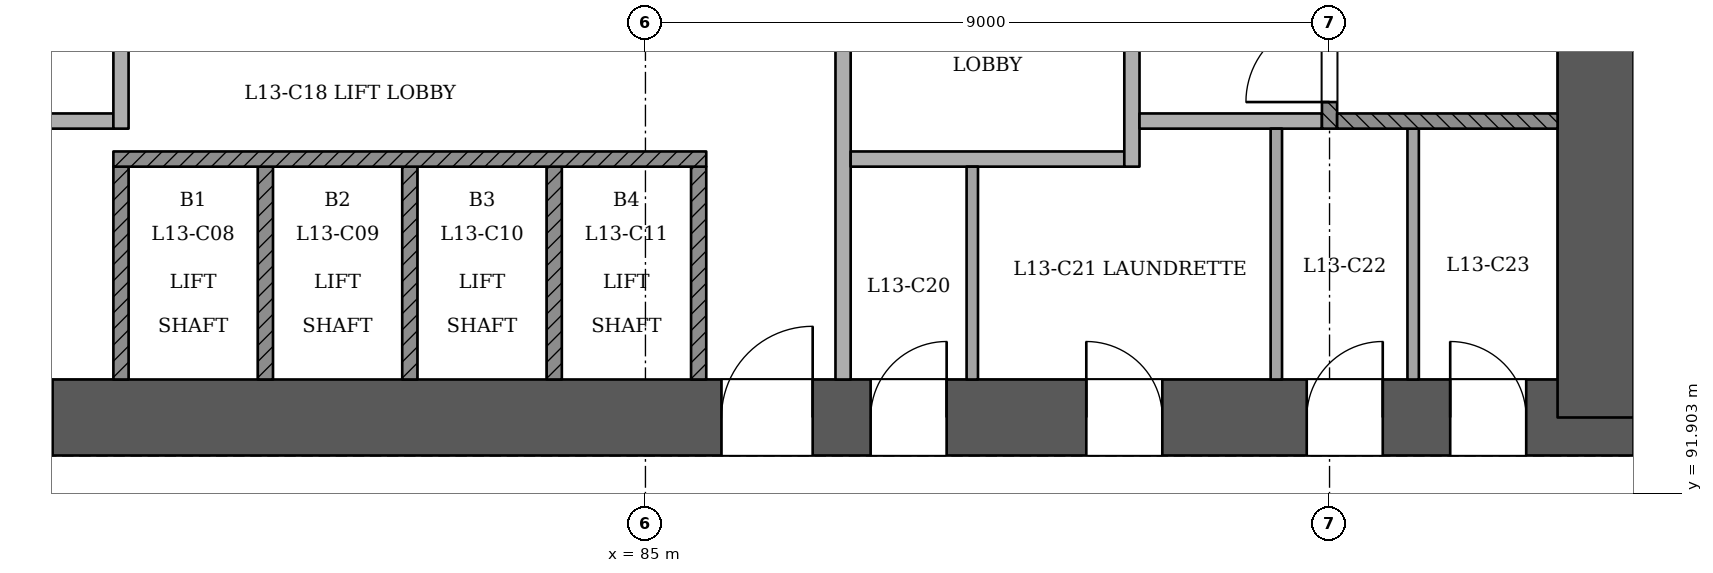
"""IFC4 building model, lengths in metres.
Left out: names, types, materials, properties, quantities, classifications, styles, units other than length and angle.
Written with IfcOpenShell. Run it as: python <this file> out.ifc"""

import sys

from ifc_helpers import new_model, si_unit, direction, frame, frame_2d, origin, place, context, subcontext, project, spatial, rectangle, extrude, element, fill, save


model = new_model("IFC4")
c1 = context("Model", 3, precision=1e-05, world=origin(), true_north=direction((0.0, 1.0)))
c2 = subcontext(c1, "Body", "Model", "MODEL_VIEW")
j1 = project(units=[si_unit("LENGTHUNIT", "METRE"), si_unit("PLANEANGLEUNIT", "RADIAN")], contexts=[c1])
p1 = place(None, origin())
s1 = spatial("IfcSite", under=j1, at=p1, CompositionType="ELEMENT")
p2 = place(p1, origin())
s2 = spatial("IfcBuilding", under=s1, at=p2, CompositionType="ELEMENT")
p3 = place(p2, frame((0.0, 0.0, 55.8)))
s3 = spatial("IfcBuildingStorey", under=s2, at=p3, CompositionType="ELEMENT", Elevation=55.8)
p4 = place(p3, frame((72.5, 92.9, 0.0), z_axis=(0.0, 0.0, 1.0), x_axis=(1.0, 0.0, 0.0)))
e1 = element("IfcWall", 1, at=p4, inside=s3, PredefinedType="SHEAR", context=c2, shape_type="SweptSolid", body=[
    extrude(rectangle(XDim=25.5, YDim=1.0, at=frame_2d((12.75, 0.0))), origin(), (0.0, 0.0, 1.0), 3.6),
])
p5 = place(p4, frame((1.3, 0.0, 0.0)))
e2 = element("IfcOpeningElement", 2, at=p5, cuts=e1, PredefinedType="OPENING", context=c2, shape_type="SweptSolid", body=[
    extrude(rectangle(XDim=1.2, YDim=2.1, at=frame_2d((0.6, 1.05))), frame((0.0, 0.51, 0.0), z_axis=(0.0, -1.0, 0.0), x_axis=(1.0, 0.0, 0.0)), (0.0, 0.0, 1.0), 1.021),
])
p6 = place(p4, frame((3.5, 0.0, 0.0)))
e3 = element("IfcOpeningElement", 3, at=p6, cuts=e1, PredefinedType="OPENING", context=c2, shape_type="SweptSolid", body=[
    extrude(rectangle(XDim=1.2, YDim=2.1, at=frame_2d((0.6, 1.05))), frame((0.0, 0.51, 0.0), z_axis=(0.0, -1.0, 0.0), x_axis=(1.0, 0.0, 0.0)), (0.0, 0.0, 1.0), 1.021),
])
p7 = place(p4, frame((13.5, 0.0, 0.0)))
e4 = element("IfcOpeningElement", 4, at=p7, cuts=e1, PredefinedType="OPENING", context=c2, shape_type="SweptSolid", body=[
    extrude(rectangle(XDim=1.2, YDim=2.1, at=frame_2d((0.6, 1.05))), frame((0.0, 0.51, 0.0), z_axis=(0.0, -1.0, 0.0), x_axis=(1.0, 0.0, 0.0)), (0.0, 0.0, 1.0), 1.021),
])
p8 = place(p4, frame((15.462, 0.0, 0.0)))
e5 = element("IfcOpeningElement", 5, at=p8, cuts=e1, PredefinedType="OPENING", context=c2, shape_type="SweptSolid", body=[
    extrude(rectangle(XDim=1.0, YDim=2.1, at=frame_2d((0.5, 1.05))), frame((0.0, 0.51, 0.0), z_axis=(0.0, -1.0, 0.0), x_axis=(1.0, 0.0, 0.0)), (0.0, 0.0, 1.0), 1.021),
])
p9 = place(p4, frame((18.3, 0.0, 0.0)))
e6 = element("IfcOpeningElement", 6, at=p9, cuts=e1, PredefinedType="OPENING", context=c2, shape_type="SweptSolid", body=[
    extrude(rectangle(XDim=1.0, YDim=2.1, at=frame_2d((0.5, 1.05))), frame((0.0, 0.51, 0.0), z_axis=(0.0, -1.0, 0.0), x_axis=(1.0, 0.0, 0.0)), (0.0, 0.0, 1.0), 1.021),
])
p10 = place(p4, frame((21.2, 0.0, 0.0)))
e7 = element("IfcOpeningElement", 7, at=p10, cuts=e1, PredefinedType="OPENING", context=c2, shape_type="SweptSolid", body=[
    extrude(rectangle(XDim=1.0, YDim=2.1, at=frame_2d((0.5, 1.05))), frame((0.0, 0.51, 0.0), z_axis=(0.0, -1.0, 0.0), x_axis=(1.0, 0.0, 0.0)), (0.0, 0.0, 1.0), 1.021),
])
p11 = place(p4, frame((23.087, 0.0, 0.0)))
e8 = element("IfcOpeningElement", 8, at=p11, cuts=e1, PredefinedType="OPENING", context=c2, shape_type="SweptSolid", body=[
    extrude(rectangle(XDim=1.0, YDim=2.1, at=frame_2d((0.5, 1.05))), frame((0.0, 0.51, 0.0), z_axis=(0.0, -1.0, 0.0), x_axis=(1.0, 0.0, 0.0)), (0.0, 0.0, 1.0), 1.021),
])
p12 = place(p3, frame((97.5, 92.9, 0.0), z_axis=(0.0, 0.0, 1.0), x_axis=(0.0, 1.0, 0.0)))
e9 = element("IfcWall", 9, at=p12, inside=s3, PredefinedType="SHEAR", context=c2, shape_type="SweptSolid", body=[
    extrude(rectangle(XDim=11.5, YDim=1.0, at=frame_2d((5.75, 0.0))), origin(), (0.0, 0.0, 1.0), 3.6),
])
p13 = place(p3, frame((64.083, 93.447, 0.0), z_axis=(0.0, 0.0, 1.0), x_axis=(0.5000018851, -0.866024315419, 0.0)))
e10 = element("IfcWall", 10, at=p13, inside=s3, PredefinedType="PARTITIONING", context=c2, shape_type="SweptSolid", body=[
    extrude(rectangle(XDim=36.0, YDim=0.15, at=frame_2d((18.0, 0.0))), origin(), (0.0, 0.0, 1.0), 2.7),
])
p14 = place(p13, frame((0.605, 0.0, 0.0)))
e11 = element("IfcOpeningElement", 11, at=p14, cuts=e10, PredefinedType="OPENING", context=c2, shape_type="SweptSolid", body=[
    extrude(rectangle(XDim=1.0, YDim=2.1, at=frame_2d((0.5, 1.05))), frame((0.0, 0.085, 0.0), z_axis=(0.0, -1.0, 0.0), x_axis=(1.0, 0.0, 0.0)), (0.0, 0.0, 1.0), 0.171),
])
p15 = place(p13, frame((7.28, 0.0, 0.0)))
e12 = element("IfcOpeningElement", 12, at=p15, cuts=e10, PredefinedType="OPENING", context=c2, shape_type="SweptSolid", body=[
    extrude(rectangle(XDim=1.0, YDim=2.1, at=frame_2d((0.5, 1.05))), frame((0.0, 0.085, 0.0), z_axis=(0.0, -1.0, 0.0), x_axis=(1.0, 0.0, 0.0)), (0.0, 0.0, 1.0), 0.171),
])
p16 = place(p13, frame((9.72, 0.0, 0.0)))
e13 = element("IfcOpeningElement", 13, at=p16, cuts=e10, PredefinedType="OPENING", context=c2, shape_type="SweptSolid", body=[
    extrude(rectangle(XDim=1.0, YDim=2.1, at=frame_2d((0.5, 1.05))), frame((0.0, 0.085, 0.0), z_axis=(0.0, -1.0, 0.0), x_axis=(1.0, 0.0, 0.0)), (0.0, 0.0, 1.0), 0.171),
])
p17 = place(p13, frame((16.395, 0.0, 0.0)))
e14 = element("IfcOpeningElement", 14, at=p17, cuts=e10, PredefinedType="OPENING", context=c2, shape_type="SweptSolid", body=[
    extrude(rectangle(XDim=1.0, YDim=2.1, at=frame_2d((0.5, 1.05))), frame((0.0, 0.085, 0.0), z_axis=(0.0, -1.0, 0.0), x_axis=(1.0, 0.0, 0.0)), (0.0, 0.0, 1.0), 0.171),
])
p18 = place(p13, frame((18.72, 0.0, 0.0)))
e15 = element("IfcOpeningElement", 15, at=p18, cuts=e10, PredefinedType="OPENING", context=c2, shape_type="SweptSolid", body=[
    extrude(rectangle(XDim=1.0, YDim=2.1, at=frame_2d((0.5, 1.05))), frame((0.0, 0.085, 0.0), z_axis=(0.0, -1.0, 0.0), x_axis=(1.0, 0.0, 0.0)), (0.0, 0.0, 1.0), 0.171),
])
p19 = place(p13, frame((25.395, 0.0, 0.0)))
e16 = element("IfcOpeningElement", 16, at=p19, cuts=e10, PredefinedType="OPENING", context=c2, shape_type="SweptSolid", body=[
    extrude(rectangle(XDim=1.0, YDim=2.1, at=frame_2d((0.5, 1.05))), frame((0.0, 0.085, 0.0), z_axis=(0.0, -1.0, 0.0), x_axis=(1.0, 0.0, 0.0)), (0.0, 0.0, 1.0), 0.171),
])
p20 = place(p13, frame((27.605, 0.0, 0.0)))
e17 = element("IfcOpeningElement", 17, at=p20, cuts=e10, PredefinedType="OPENING", context=c2, shape_type="SweptSolid", body=[
    extrude(rectangle(XDim=1.0, YDim=2.1, at=frame_2d((0.5, 1.05))), frame((0.0, 0.085, 0.0), z_axis=(0.0, -1.0, 0.0), x_axis=(1.0, 0.0, 0.0)), (0.0, 0.0, 1.0), 0.171),
])
p21 = place(p13, frame((34.28, 0.0, 0.0)))
e18 = element("IfcOpeningElement", 18, at=p21, cuts=e10, PredefinedType="OPENING", context=c2, shape_type="SweptSolid", body=[
    extrude(rectangle(XDim=1.0, YDim=2.1, at=frame_2d((0.5, 1.05))), frame((0.0, 0.085, 0.0), z_axis=(0.0, -1.0, 0.0), x_axis=(1.0, 0.0, 0.0)), (0.0, 0.0, 1.0), 0.171),
])
p22 = place(p3, frame((85.99, 58.932, 0.0), z_axis=(0.0, 0.0, 1.0), x_axis=(0.500001547762, 0.866024510182, 0.0)))
e19 = element("IfcWall", 19, at=p22, inside=s3, PredefinedType="PARTITIONING", context=c2, shape_type="SweptSolid", body=[
    extrude(rectangle(XDim=42.454, YDim=0.15, at=frame_2d((21.227, 0.0))), origin(), (0.0, 0.0, 1.0), 2.7),
])
p23 = place(p22, frame((3.577, 0.0, 0.0)))
e20 = element("IfcOpeningElement", 20, at=p23, cuts=e19, PredefinedType="OPENING", context=c2, shape_type="SweptSolid", body=[
    extrude(rectangle(XDim=1.2, YDim=2.1, at=frame_2d((0.6, 1.05))), frame((0.0, 0.085, 0.0), z_axis=(0.0, -1.0, 0.0), x_axis=(1.0, 0.0, 0.0)), (0.0, 0.0, 1.0), 0.171),
])
p24 = place(p22, frame((11.134, 0.0, 0.0)))
e21 = element("IfcOpeningElement", 21, at=p24, cuts=e19, PredefinedType="OPENING", context=c2, shape_type="SweptSolid", body=[
    extrude(rectangle(XDim=1.0, YDim=2.1, at=frame_2d((0.5, 1.05))), frame((0.0, 0.085, 0.0), z_axis=(0.0, -1.0, 0.0), x_axis=(1.0, 0.0, 0.0)), (0.0, 0.0, 1.0), 0.171),
])
p25 = place(p22, frame((13.575, 0.0, 0.0)))
e22 = element("IfcOpeningElement", 22, at=p25, cuts=e19, PredefinedType="OPENING", context=c2, shape_type="SweptSolid", body=[
    extrude(rectangle(XDim=1.0, YDim=2.1, at=frame_2d((0.5, 1.05))), frame((0.0, 0.085, 0.0), z_axis=(0.0, -1.0, 0.0), x_axis=(1.0, 0.0, 0.0)), (0.0, 0.0, 1.0), 0.171),
])
p26 = place(p22, frame((20.134, 0.0, 0.0)))
e23 = element("IfcOpeningElement", 23, at=p26, cuts=e19, PredefinedType="OPENING", context=c2, shape_type="SweptSolid", body=[
    extrude(rectangle(XDim=1.0, YDim=2.1, at=frame_2d((0.5, 1.05))), frame((0.0, 0.085, 0.0), z_axis=(0.0, -1.0, 0.0), x_axis=(1.0, 0.0, 0.0)), (0.0, 0.0, 1.0), 0.171),
])
p27 = place(p22, frame((22.575, 0.0, 0.0)))
e24 = element("IfcOpeningElement", 24, at=p27, cuts=e19, PredefinedType="OPENING", context=c2, shape_type="SweptSolid", body=[
    extrude(rectangle(XDim=1.0, YDim=2.1, at=frame_2d((0.5, 1.05))), frame((0.0, 0.085, 0.0), z_axis=(0.0, -1.0, 0.0), x_axis=(1.0, 0.0, 0.0)), (0.0, 0.0, 1.0), 0.171),
])
p28 = place(p22, frame((29.134, 0.0, 0.0)))
e25 = element("IfcOpeningElement", 25, at=p28, cuts=e19, PredefinedType="OPENING", context=c2, shape_type="SweptSolid", body=[
    extrude(rectangle(XDim=1.0, YDim=2.1, at=frame_2d((0.5, 1.05))), frame((0.0, 0.085, 0.0), z_axis=(0.0, -1.0, 0.0), x_axis=(1.0, 0.0, 0.0)), (0.0, 0.0, 1.0), 0.171),
])
p29 = place(p22, frame((31.575, 0.0, 0.0)))
e26 = element("IfcOpeningElement", 26, at=p29, cuts=e19, PredefinedType="OPENING", context=c2, shape_type="SweptSolid", body=[
    extrude(rectangle(XDim=1.0, YDim=2.1, at=frame_2d((0.5, 1.05))), frame((0.0, 0.085, 0.0), z_axis=(0.0, -1.0, 0.0), x_axis=(1.0, 0.0, 0.0)), (0.0, 0.0, 1.0), 0.171),
])
p30 = place(p22, frame((38.134, 0.0, 0.0)))
e27 = element("IfcOpeningElement", 27, at=p30, cuts=e19, PredefinedType="OPENING", context=c2, shape_type="SweptSolid", body=[
    extrude(rectangle(XDim=1.0, YDim=2.1, at=frame_2d((0.5, 1.05))), frame((0.0, 0.085, 0.0), z_axis=(0.0, -1.0, 0.0), x_axis=(1.0, 0.0, 0.0)), (0.0, 0.0, 1.0), 0.171),
])
p31 = place(p22, frame((41.161, 0.0, 0.0)))
e28 = element("IfcOpeningElement", 28, at=p31, cuts=e19, PredefinedType="OPENING", context=c2, shape_type="SweptSolid", body=[
    extrude(rectangle(XDim=1.0, YDim=2.1, at=frame_2d((0.5, 1.05))), frame((0.0, 0.085, 0.0), z_axis=(0.0, -1.0, 0.0), x_axis=(1.0, 0.0, 0.0)), (0.0, 0.0, 1.0), 0.171),
])
for number, where, z_axis, x_axis in (
    (29, (78.1, 93.4, 0.0), (0.0, 0.0, 1.0), (0.0, 1.0, 0.0)),
    (30, (80.0, 93.4, 0.0), (0.0, 0.0, 1.0), (0.0, 1.0, 0.0)),
    (31, (81.9, 93.4, 0.0), (0.0, 0.0, 1.0), (0.0, 1.0, 0.0)),
    (32, (83.8, 93.4, 0.0), (0.0, 0.0, 1.0), (0.0, 1.0, 0.0)),
    (33, (85.7, 93.4, 0.0), (0.0, 0.0, 1.0), (0.0, 1.0, 0.0)),
):
    element("IfcWall", number, at=place(p3, frame(where, z_axis=z_axis, x_axis=x_axis)), inside=s3, PredefinedType="SOLIDWALL", context=c2, shape_type="SweptSolid", body=[
        extrude(rectangle(XDim=2.8, YDim=0.2, at=frame_2d((1.4, 0.0))), origin(), (0.0, 0.0, 1.0), 3.1),
    ])
p32 = place(p3, frame((87.6, 93.4, 0.0), z_axis=(0.0, 0.0, 1.0), x_axis=(0.0, 1.0, 0.0)))
e34 = element("IfcWall", 34, at=p32, inside=s3, PredefinedType="PARTITIONING", context=c2, shape_type="SweptSolid", body=[
    extrude(rectangle(XDim=7.0, YDim=0.2, at=frame_2d((3.5, 0.0))), origin(), (0.0, 0.0, 1.0), 3.1),
])
p33 = place(p32, frame((4.45, 0.0, 0.0)))
e35 = element("IfcOpeningElement", 35, at=p33, cuts=e34, PredefinedType="OPENING", context=c2, shape_type="SweptSolid", body=[
    extrude(rectangle(XDim=1.1, YDim=2.1, at=frame_2d((0.55, 1.05))), frame((0.0, 0.11, 0.0), z_axis=(0.0, -1.0, 0.0), x_axis=(1.0, 0.0, 0.0)), (0.0, 0.0, 1.0), 0.221),
])
p34 = place(p3, frame((89.3, 93.4, 0.0), z_axis=(0.0, 0.0, 1.0), x_axis=(0.0, 1.0, 0.0)))
e36 = element("IfcWall", 36, at=p34, inside=s3, PredefinedType="PARTITIONING", context=c2, shape_type="SweptSolid", body=[
    extrude(rectangle(XDim=2.8, YDim=0.15, at=frame_2d((1.4, 0.0))), origin(), (0.0, 0.0, 1.0), 3.1),
])
for number, where, z_axis, x_axis in (
    (37, (93.3, 93.4, 0.0), (0.0, 0.0, 1.0), (0.0, 1.0, 0.0)),
    (38, (95.1, 93.4, 0.0), (0.0, 0.0, 1.0), (0.0, 1.0, 0.0)),
):
    element("IfcWall", number, at=place(p3, frame(where, z_axis=z_axis, x_axis=x_axis)), inside=s3, PredefinedType="PARTITIONING", context=c2, shape_type="SweptSolid", body=[
        extrude(rectangle(XDim=3.3, YDim=0.15, at=frame_2d((1.65, 0.0))), origin(), (0.0, 0.0, 1.0), 3.1),
    ])
p35 = place(p3, frame((78.0, 96.3, 0.0), z_axis=(0.0, 0.0, 1.0), x_axis=(1.0, 0.0, 0.0)))
e39 = element("IfcWall", 39, at=p35, inside=s3, PredefinedType="SOLIDWALL", context=c2, shape_type="SweptSolid", body=[
    extrude(rectangle(XDim=7.8, YDim=0.2, at=frame_2d((3.9, 0.0))), origin(), (0.0, 0.0, 1.0), 3.1),
])
p36 = place(p3, frame((87.7, 96.3, 0.0), z_axis=(0.0, 0.0, 1.0), x_axis=(1.0, 0.0, 0.0)))
e40 = element("IfcWall", 40, at=p36, inside=s3, PredefinedType="PARTITIONING", context=c2, shape_type="SweptSolid", body=[
    extrude(rectangle(XDim=3.6, YDim=0.2, at=frame_2d((1.8, 0.0))), origin(), (0.0, 0.0, 1.0), 3.1),
])
p37 = place(p3, frame((91.4, 96.2, 0.0), z_axis=(0.0, 0.0, 1.0), x_axis=(0.0, 1.0, 0.0)))
e41 = element("IfcWall", 41, at=p37, inside=s3, PredefinedType="PARTITIONING", context=c2, shape_type="SweptSolid", body=[
    extrude(rectangle(XDim=4.2, YDim=0.2, at=frame_2d((2.1, 0.0))), origin(), (0.0, 0.0, 1.0), 3.1),
])
p38 = place(p37, frame((2.45, 0.0, 0.0)))
e42 = element("IfcOpeningElement", 42, at=p38, cuts=e41, PredefinedType="OPENING", context=c2, shape_type="SweptSolid", body=[
    extrude(rectangle(XDim=1.1, YDim=2.1, at=frame_2d((0.55, 1.05))), frame((0.0, 0.11, 0.0), z_axis=(0.0, -1.0, 0.0), x_axis=(1.0, 0.0, 0.0)), (0.0, 0.0, 1.0), 0.221),
])
p39 = place(p3, frame((76.1, 96.8, 0.0), z_axis=(0.0, 0.0, 1.0), x_axis=(1.0, 0.0, 0.0)))
e43 = element("IfcWall", 43, at=p39, inside=s3, PredefinedType="PARTITIONING", context=c2, shape_type="SweptSolid", body=[
    extrude(rectangle(XDim=1.9, YDim=0.2, at=frame_2d((0.95, 0.0))), origin(), (0.0, 0.0, 1.0), 3.1),
])
p40 = place(p3, frame((78.1, 96.7, 0.0), z_axis=(0.0, 0.0, 1.0), x_axis=(0.0, 1.0, 0.0)))
e44 = element("IfcWall", 44, at=p40, inside=s3, PredefinedType="PARTITIONING", context=c2, shape_type="SweptSolid", body=[
    extrude(rectangle(XDim=3.7, YDim=0.2, at=frame_2d((1.85, 0.0))), origin(), (0.0, 0.0, 1.0), 3.1),
])
p41 = place(p40, frame((1.95, 0.0, 0.0)))
e45 = element("IfcOpeningElement", 45, at=p41, cuts=e44, PredefinedType="OPENING", context=c2, shape_type="SweptSolid", body=[
    extrude(rectangle(XDim=1.1, YDim=2.1, at=frame_2d((0.55, 1.05))), frame((0.0, 0.11, 0.0), z_axis=(0.0, -1.0, 0.0), x_axis=(1.0, 0.0, 0.0)), (0.0, 0.0, 1.0), 0.221),
])
p42 = place(p3, frame((91.5, 96.8, 0.0), z_axis=(0.0, 0.0, 1.0), x_axis=(1.0, 0.0, 0.0)))
e46 = element("IfcWall", 46, at=p42, inside=s3, PredefinedType="PARTITIONING", context=c2, shape_type="SweptSolid", body=[
    extrude(rectangle(XDim=2.4, YDim=0.2, at=frame_2d((1.2, 0.0))), origin(), (0.0, 0.0, 1.0), 3.1),
])
p43 = place(p3, frame((94.0, 96.7, 0.0), z_axis=(0.0, 0.0, 1.0), x_axis=(0.0, 1.0, 0.0)))
e47 = element("IfcWall", 47, at=p43, inside=s3, PredefinedType="SOLIDWALL", context=c2, shape_type="SweptSolid", body=[
    extrude(rectangle(XDim=3.7, YDim=0.2, at=frame_2d((1.85, 0.0))), origin(), (0.0, 0.0, 1.0), 3.1),
])
p44 = place(p43, frame((0.35, 0.0, 0.0)))
e48 = element("IfcOpeningElement", 48, at=p44, cuts=e47, PredefinedType="OPENING", context=c2, shape_type="SweptSolid", body=[
    extrude(rectangle(XDim=1.1, YDim=2.1, at=frame_2d((0.55, 1.05))), frame((0.0, 0.11, 0.0), z_axis=(0.0, -1.0, 0.0), x_axis=(1.0, 0.0, 0.0)), (0.0, 0.0, 1.0), 0.221),
])
p45 = place(p3, frame((94.1, 96.8, 0.0), z_axis=(0.0, 0.0, 1.0), x_axis=(1.0, 0.0, 0.0)))
e49 = element("IfcWall", 49, at=p45, inside=s3, PredefinedType="SOLIDWALL", context=c2, shape_type="SweptSolid", body=[
    extrude(rectangle(XDim=2.9, YDim=0.2, at=frame_2d((1.45, 0.0))), origin(), (0.0, 0.0, 1.0), 3.1),
])
p46 = place(p44, origin())
e50 = element("IfcDoor", 50, at=p46, inside=s3, OperationType="SINGLE_SWING_LEFT", PredefinedType="NOTDEFINED", context=c2, shape_type="SweptSolid", body=[
    extrude(rectangle(XDim=1.1, YDim=2.1, at=frame_2d((0.55, 1.05))), frame((0.0, 0.025, 0.0), z_axis=(0.0, -1.0, 0.0), x_axis=(1.0, 0.0, 0.0)), (0.0, 0.0, 1.0), 0.05),
])
fill(e48, e50)
p47 = place(p6, origin())
e51 = element("IfcDoor", 51, at=p47, inside=s3, OperationType="SINGLE_SWING_LEFT", PredefinedType="NOTDEFINED", context=c2, shape_type="SweptSolid", body=[
    extrude(rectangle(XDim=1.2, YDim=2.1, at=frame_2d((0.6, 1.05))), frame((0.0, 0.025, 0.0), z_axis=(0.0, -1.0, 0.0), x_axis=(1.0, 0.0, 0.0)), (0.0, 0.0, 1.0), 0.05),
])
fill(e3, e51)
p48 = place(p7, origin())
e52 = element("IfcDoor", 52, at=p48, inside=s3, OperationType="SINGLE_SWING_RIGHT", PredefinedType="NOTDEFINED", context=c2, shape_type="SweptSolid", body=[
    extrude(rectangle(XDim=1.2, YDim=2.1, at=frame_2d((0.6, 1.05))), frame((0.0, 0.025, 0.0), z_axis=(0.0, -1.0, 0.0), x_axis=(1.0, 0.0, 0.0)), (0.0, 0.0, 1.0), 0.05),
])
fill(e4, e52)
p49 = place(p8, origin())
e53 = element("IfcDoor", 53, at=p49, inside=s3, OperationType="SINGLE_SWING_RIGHT", PredefinedType="NOTDEFINED", context=c2, shape_type="SweptSolid", body=[
    extrude(rectangle(XDim=1.0, YDim=2.1, at=frame_2d((0.5, 1.05))), frame((0.0, 0.025, 0.0), z_axis=(0.0, -1.0, 0.0), x_axis=(1.0, 0.0, 0.0)), (0.0, 0.0, 1.0), 0.05),
])
fill(e5, e53)
p50 = place(p9, origin())
e54 = element("IfcDoor", 54, at=p50, inside=s3, OperationType="SINGLE_SWING_LEFT", PredefinedType="NOTDEFINED", context=c2, shape_type="SweptSolid", body=[
    extrude(rectangle(XDim=1.0, YDim=2.1, at=frame_2d((0.5, 1.05))), frame((0.0, 0.025, 0.0), z_axis=(0.0, -1.0, 0.0), x_axis=(1.0, 0.0, 0.0)), (0.0, 0.0, 1.0), 0.05),
])
fill(e6, e54)
p51 = place(p10, origin())
e55 = element("IfcDoor", 55, at=p51, inside=s3, OperationType="SINGLE_SWING_RIGHT", PredefinedType="NOTDEFINED", context=c2, shape_type="SweptSolid", body=[
    extrude(rectangle(XDim=1.0, YDim=2.1, at=frame_2d((0.5, 1.05))), frame((0.0, 0.025, 0.0), z_axis=(0.0, -1.0, 0.0), x_axis=(1.0, 0.0, 0.0)), (0.0, 0.0, 1.0), 0.05),
])
fill(e7, e55)
p52 = place(p11, origin())
e56 = element("IfcDoor", 56, at=p52, inside=s3, OperationType="SINGLE_SWING_LEFT", PredefinedType="NOTDEFINED", context=c2, shape_type="SweptSolid", body=[
    extrude(rectangle(XDim=1.0, YDim=2.1, at=frame_2d((0.5, 1.05))), frame((0.0, 0.025, 0.0), z_axis=(0.0, -1.0, 0.0), x_axis=(1.0, 0.0, 0.0)), (0.0, 0.0, 1.0), 0.05),
])
fill(e8, e56)
save(model, sys.argv[1])
